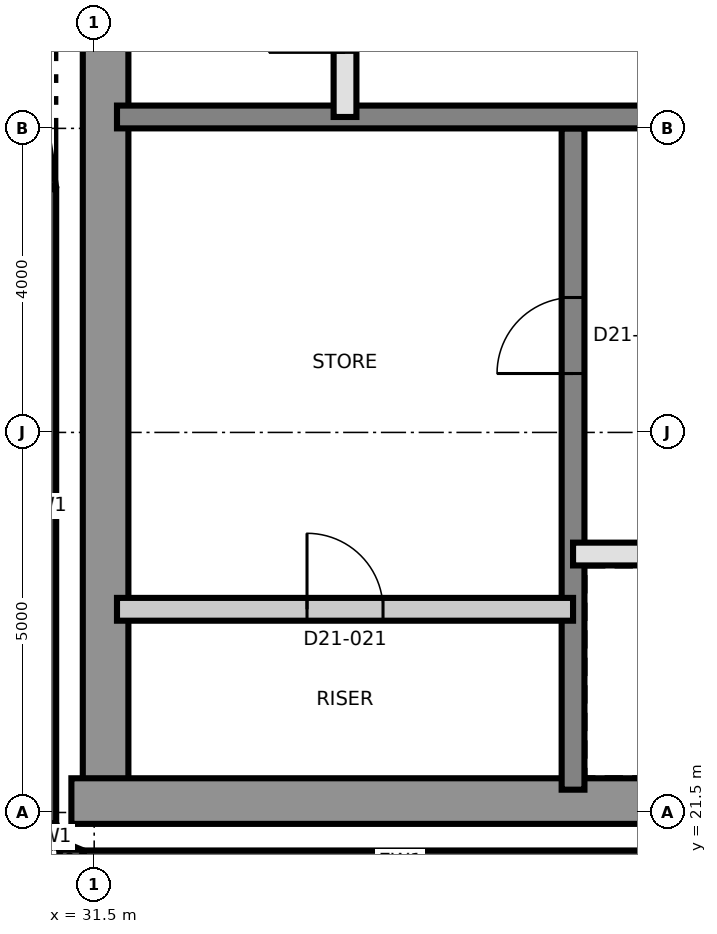
"""IFC4 building model, lengths in metres.
Left out: names, types, materials, properties, quantities, classifications, styles, units other than length and angle.
Written with IfcOpenShell. Run it as: python <this file> out.ifc"""

import sys

from ifc_helpers import new_model, si_unit, direction, frame, frame_2d, origin, place, context, subcontext, project, spatial, rectangle, extrude, element, fill, save


model = new_model("IFC4")
c1 = context("Model", 3, precision=1e-05, world=origin(), true_north=direction((0.0, 1.0)))
c2 = subcontext(c1, "Body", "Model", "MODEL_VIEW")
j1 = project(units=[si_unit("LENGTHUNIT", "METRE"), si_unit("PLANEANGLEUNIT", "RADIAN")], contexts=[c1])
p1 = place(None, origin())
s1 = spatial("IfcSite", under=j1, at=p1, CompositionType="ELEMENT")
p2 = place(p1, origin())
s2 = spatial("IfcBuilding", under=s1, at=p2, CompositionType="ELEMENT")
p3 = place(p2, frame((0.0, 0.0, 190.3)))
s3 = spatial("IfcBuildingStorey", under=s2, at=p3, CompositionType="ELEMENT", Elevation=190.3)
p4 = place(p3, frame((31.65, 21.8, 0.0), z_axis=(0.0, 0.0, 1.0), x_axis=(0.0, 1.0, 0.0)))
e1 = element("IfcWall", 1, at=p4, inside=s3, PredefinedType="SHEAR", context=c2, shape_type="SweptSolid", body=[
    extrude(rectangle(XDim=17.4, YDim=0.6, at=frame_2d((8.7, 0.0))), origin(), (0.0, 0.0, 1.0), 5.5),
])
p5 = place(p3, frame((31.2, 21.65, 0.0), z_axis=(0.0, 0.0, 1.0), x_axis=(1.0, 0.0, 0.0)))
e2 = element("IfcWall", 2, at=p5, inside=s3, PredefinedType="SHEAR", context=c2, shape_type="SweptSolid", body=[
    extrude(rectangle(XDim=27.0, YDim=0.6, at=frame_2d((13.5, 0.0))), origin(), (0.0, 0.0, 1.0), 5.5),
])
p6 = place(p3, frame((37.8, 21.8, 0.0), z_axis=(0.0, 0.0, 1.0), x_axis=(0.0, 1.0, 0.0)))
e3 = element("IfcWall", 3, at=p6, inside=s3, PredefinedType="SHEAR", context=c2, shape_type="SweptSolid", body=[
    extrude(rectangle(XDim=8.7, YDim=0.3, at=frame_2d((4.35, 0.0))), origin(), (0.0, 0.0, 1.0), 5.5),
])
p7 = place(p6, frame((5.475, 0.0, 0.0)))
e4 = element("IfcOpeningElement", 4, at=p7, cuts=e3, PredefinedType="OPENING", context=c2, shape_type="SweptSolid", body=[
    extrude(rectangle(XDim=1.0, YDim=2.1, at=frame_2d((0.5, 1.05))), frame((0.0, 0.16, 0.0), z_axis=(0.0, -1.0, 0.0), x_axis=(1.0, 0.0, 0.0)), (0.0, 0.0, 1.0), 0.32),
])
p8 = place(p3, frame((31.8, 30.65, 0.0), z_axis=(0.0, 0.0, 1.0), x_axis=(1.0, 0.0, 0.0)))
e5 = element("IfcWall", 5, at=p8, inside=s3, PredefinedType="SHEAR", context=c2, shape_type="SweptSolid", body=[
    extrude(rectangle(XDim=26.4, YDim=0.3, at=frame_2d((13.2, 0.0))), origin(), (0.0, 0.0, 1.0), 5.5),
])
p9 = place(p8, frame((24.7, 0.0, 0.0)))
e6 = element("IfcOpeningElement", 6, at=p9, cuts=e5, PredefinedType="OPENING", context=c2, shape_type="SweptSolid", body=[
    extrude(rectangle(XDim=1.0, YDim=2.1, at=frame_2d((0.5, 1.05))), frame((0.0, 0.16, 0.0), z_axis=(0.0, -1.0, 0.0), x_axis=(1.0, 0.0, 0.0)), (0.0, 0.0, 1.0), 0.32),
])
p10 = place(p3, frame((30.85, 29.699, 0.0), z_axis=(0.0, 0.0, 1.0), x_axis=(0.0, -1.0, 0.0)))
e7 = element("IfcWall", 7, at=p10, inside=s3, PredefinedType="SOLIDWALL", context=c2, shape_type="SweptSolid", body=[
    extrude(rectangle(XDim=8.34, YDim=0.3, at=frame_2d((4.17, 0.0))), origin(), (0.0, 0.0, 1.0), 5.2),
])
for number, where, z_axis, x_axis in (
    (8, (30.861, 21.302, 0.0), (0.0, 0.0, 1.0), (0.383, -0.924, 0.0)),
    (9, (31.048, 20.967, 0.0), (0.0, 0.0, 1.0), (0.924, -0.383, 0.0)),
):
    element("IfcWall", number, at=place(p3, frame(where, z_axis=z_axis, x_axis=x_axis)), inside=s3, PredefinedType="SOLIDWALL", context=c2, shape_type="SweptSolid", body=[
        extrude(rectangle(XDim=0.275, YDim=0.3, at=frame_2d((0.138, 0.0))), origin(), (0.0, 0.0, 1.0), 5.2),
    ])
p11 = place(p3, frame((31.36, 20.85, 0.0), z_axis=(0.0, 0.0, 1.0), x_axis=(1.0, 0.0, 0.0)))
e10 = element("IfcWall", 10, at=p11, inside=s3, PredefinedType="SOLIDWALL", context=c2, shape_type="SweptSolid", body=[
    extrude(rectangle(XDim=8.34, YDim=0.3, at=frame_2d((4.17, 0.0))), origin(), (0.0, 0.0, 1.0), 5.2),
])
p12 = place(p3, frame((30.152, 34.0, 0.0), z_axis=(0.0, 0.0, 1.0), x_axis=(0.160697303067, -0.987003736967, 0.0)))
e11 = element("IfcWall", 11, at=p12, inside=s3, PredefinedType="SOLIDWALL", context=c2, shape_type="SweptSolid", body=[
    extrude(rectangle(XDim=4.333, YDim=0.3, at=frame_2d((2.167, 0.0))), origin(), (0.0, 0.0, 1.0), 5.2),
])
p13 = place(p3, frame((31.8, 24.173, 0.0), z_axis=(0.0, 0.0, 1.0), x_axis=(1.0, 0.0, 0.0)))
e12 = element("IfcWall", 12, at=p13, inside=s3, PredefinedType="PARTITIONING", context=c2, shape_type="SweptSolid", body=[
    extrude(rectangle(XDim=6.0, YDim=0.3, at=frame_2d((3.0, 0.0))), origin(), (0.0, 0.0, 1.0), 5.2),
])
p14 = place(p13, frame((2.5, 0.0, 0.0)))
e13 = element("IfcOpeningElement", 13, at=p14, cuts=e12, PredefinedType="OPENING", context=c2, shape_type="SweptSolid", body=[
    extrude(rectangle(XDim=1.0, YDim=2.1, at=frame_2d((0.5, 1.05))), frame((0.0, 0.16, 0.0), z_axis=(0.0, -1.0, 0.0), x_axis=(1.0, 0.0, 0.0)), (0.0, 0.0, 1.0), 0.32),
])
p15 = place(p3, frame((37.8, 24.9, 0.0), z_axis=(0.0, 0.0, 1.0), x_axis=(1.0, 0.0, 0.0)))
e14 = element("IfcWall", 14, at=p15, inside=s3, PredefinedType="SOLIDWALL", context=c2, shape_type="SweptSolid", body=[
    extrude(rectangle(XDim=12.0, YDim=0.3, at=frame_2d((6.0, 0.0))), origin(), (0.0, 0.0, 1.0), 5.2),
])
p16 = place(p15, frame((1.05, 0.0, 0.0)))
e15 = element("IfcOpeningElement", 15, at=p16, cuts=e14, PredefinedType="OPENING", context=c2, shape_type="SweptSolid", body=[
    extrude(rectangle(XDim=0.9, YDim=2.1, at=frame_2d((0.45, 1.05))), frame((0.0, 0.16, 0.0), z_axis=(0.0, -1.0, 0.0), x_axis=(1.0, 0.0, 0.0)), (0.0, 0.0, 1.0), 0.32),
])
p17 = place(p15, frame((10.05, 0.0, 0.0)))
e16 = element("IfcOpeningElement", 16, at=p17, cuts=e14, PredefinedType="OPENING", context=c2, shape_type="SweptSolid", body=[
    extrude(rectangle(XDim=0.9, YDim=2.1, at=frame_2d((0.45, 1.05))), frame((0.0, 0.16, 0.0), z_axis=(0.0, -1.0, 0.0), x_axis=(1.0, 0.0, 0.0)), (0.0, 0.0, 1.0), 0.32),
])
p18 = place(p15, frame((3.95, 0.0, 0.0)))
e17 = element("IfcOpeningElement", 17, at=p18, cuts=e14, PredefinedType="OPENING", context=c2, shape_type="SweptSolid", body=[
    extrude(rectangle(XDim=1.1, YDim=2.4, at=frame_2d((0.55, 1.2))), frame((0.0, 0.16, 0.0), z_axis=(0.0, -1.0, 0.0), x_axis=(1.0, 0.0, 0.0)), (0.0, 0.0, 1.0), 0.32),
])
p19 = place(p15, frame((6.95, 0.0, 0.0)))
e18 = element("IfcOpeningElement", 18, at=p19, cuts=e14, PredefinedType="OPENING", context=c2, shape_type="SweptSolid", body=[
    extrude(rectangle(XDim=1.1, YDim=2.4, at=frame_2d((0.55, 1.2))), frame((0.0, 0.16, 0.0), z_axis=(0.0, -1.0, 0.0), x_axis=(1.0, 0.0, 0.0)), (0.0, 0.0, 1.0), 0.32),
])
p20 = place(p3, frame((34.8, 30.65, 0.0), z_axis=(0.0, 0.0, 1.0), x_axis=(0.0, 1.0, 0.0)))
e19 = element("IfcWall", 19, at=p20, inside=s3, PredefinedType="SOLIDWALL", context=c2, shape_type="SweptSolid", body=[
    extrude(rectangle(XDim=2.7, YDim=0.3, at=frame_2d((1.35, 0.0))), origin(), (0.0, 0.0, 1.0), 5.2),
])
p21 = place(p20, frame((0.85, 0.0, 0.0)))
e20 = element("IfcOpeningElement", 20, at=p21, cuts=e19, PredefinedType="OPENING", context=c2, shape_type="SweptSolid", body=[
    extrude(rectangle(XDim=1.0, YDim=2.1, at=frame_2d((0.5, 1.05))), frame((0.0, 0.16, 0.0), z_axis=(0.0, -1.0, 0.0), x_axis=(1.0, 0.0, 0.0)), (0.0, 0.0, 1.0), 0.32),
])
p22 = place(p7, origin())
e21 = element("IfcDoor", 21, at=p22, inside=s3, OperationType="SINGLE_SWING_LEFT", PredefinedType="DOOR", context=c2, shape_type="SweptSolid", body=[
    extrude(rectangle(XDim=1.0, YDim=2.1, at=frame_2d((0.5, 1.05))), frame((0.0, 0.025, 0.0), z_axis=(0.0, -1.0, 0.0), x_axis=(1.0, 0.0, 0.0)), (0.0, 0.0, 1.0), 0.05),
])
fill(e4, e21)
p23 = place(p14, origin())
e22 = element("IfcDoor", 22, at=p23, inside=s3, OperationType="SINGLE_SWING_RIGHT", PredefinedType="DOOR", context=c2, shape_type="SweptSolid", body=[
    extrude(rectangle(XDim=1.0, YDim=2.1, at=frame_2d((0.5, 1.05))), frame((0.0, 0.025, 0.0), z_axis=(0.0, -1.0, 0.0), x_axis=(1.0, 0.0, 0.0)), (0.0, 0.0, 1.0), 0.05),
])
fill(e13, e22)
save(model, sys.argv[1])
